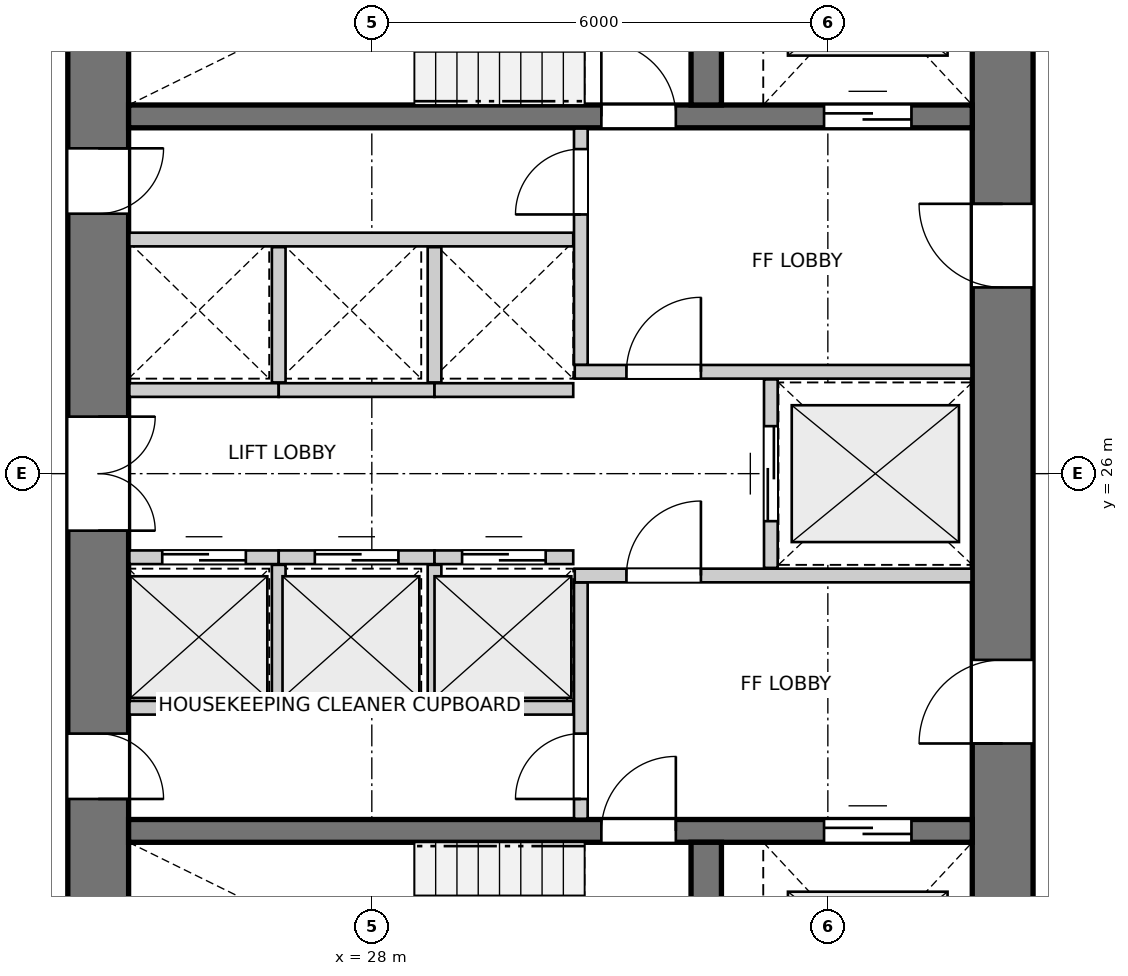
"""IFC4 building model, lengths in metres.
Left out: names, types, materials, properties, quantities, classifications, styles, units other than length and angle.
Written with IfcOpenShell. Run it as: python <this file> out.ifc"""

import sys

from ifc_helpers import new_model, si_unit, direction, frame, frame_2d, origin, place, context, subcontext, project, spatial, rectangle, extrude, source, transform, mapped, element, fill, save


model = new_model("IFC4")
c1 = context("Model", 3, precision=1e-05, world=origin(), true_north=direction((0.0, 1.0)))
c2 = subcontext(c1, "Body", "Model", "MODEL_VIEW")
j1 = project(units=[si_unit("LENGTHUNIT", "METRE"), si_unit("PLANEANGLEUNIT", "RADIAN")], contexts=[c1])
p1 = place(None, origin())
s1 = spatial("IfcSite", under=j1, at=p1, CompositionType="ELEMENT")
p2 = place(p1, origin())
s2 = spatial("IfcBuilding", under=s1, at=p2, CompositionType="ELEMENT")
p3 = place(p2, frame((0.0, 0.0, 7.8)))
s3 = spatial("IfcBuildingStorey", under=s2, at=p3, CompositionType="ELEMENT", Elevation=7.8)
p4 = place(p3, frame((24.4, 33.8, 0.0), z_axis=(0.0, 0.0, 1.0), x_axis=(0.0, -1.0, 0.0)))
e1 = element("IfcWall", 1, at=p4, inside=s3, PredefinedType="SHEAR", context=c2, shape_type="SweptSolid", body=[
    extrude(rectangle(XDim=15.6, YDim=0.8, at=frame_2d((7.8, 0.0))), origin(), (0.0, 0.0, 1.0), 2.94),
])
p5 = place(p4, frame((7.05, 0.0, 0.0)))
e2 = element("IfcOpeningElement", 2, at=p5, cuts=e1, PredefinedType="OPENING", context=c2, shape_type="SweptSolid", body=[
    extrude(rectangle(XDim=1.5, YDim=2.15, at=frame_2d((0.75, 1.075))), frame((0.0, 0.41, 0.0), z_axis=(0.0, -1.0, 0.0), x_axis=(1.0, 0.0, 0.0)), (0.0, 0.0, 1.0), 0.82),
])
p6 = place(p4, frame((3.52, 0.0, 0.0)))
e3 = element("IfcOpeningElement", 3, at=p6, cuts=e1, PredefinedType="OPENING", context=c2, shape_type="SweptSolid", body=[
    extrude(rectangle(XDim=0.86, YDim=2.05, at=frame_2d((0.43, 1.025))), frame((0.0, 0.41, 0.0), z_axis=(0.0, -1.0, 0.0), x_axis=(1.0, 0.0, 0.0)), (0.0, 0.0, 1.0), 0.82),
])
p7 = place(p4, frame((11.22, 0.0, 0.0)))
e4 = element("IfcOpeningElement", 4, at=p7, cuts=e1, PredefinedType="OPENING", context=c2, shape_type="SweptSolid", body=[
    extrude(rectangle(XDim=0.86, YDim=2.05, at=frame_2d((0.43, 1.025))), frame((0.0, 0.41, 0.0), z_axis=(0.0, -1.0, 0.0), x_axis=(1.0, 0.0, 0.0)), (0.0, 0.0, 1.0), 0.82),
])
p8 = place(p3, frame((36.3, 18.2, 0.0), z_axis=(0.0, 0.0, 1.0), x_axis=(0.0, 1.0, 0.0)))
e5 = element("IfcWall", 5, at=p8, inside=s3, PredefinedType="SHEAR", context=c2, shape_type="SweptSolid", body=[
    extrude(rectangle(XDim=15.6, YDim=0.8, at=frame_2d((7.8, 0.0))), origin(), (0.0, 0.0, 1.0), 2.94),
])
p9 = place(p8, frame((4.25, 0.0, 0.0)))
e6 = element("IfcOpeningElement", 6, at=p9, cuts=e5, PredefinedType="OPENING", context=c2, shape_type="SweptSolid", body=[
    extrude(rectangle(XDim=1.1, YDim=2.15, at=frame_2d((0.55, 1.075))), frame((0.0, 0.41, 0.0), z_axis=(0.0, -1.0, 0.0), x_axis=(1.0, 0.0, 0.0)), (0.0, 0.0, 1.0), 0.82),
])
p10 = place(p8, frame((10.25, 0.0, 0.0)))
e7 = element("IfcOpeningElement", 7, at=p10, cuts=e5, PredefinedType="OPENING", context=c2, shape_type="SweptSolid", body=[
    extrude(rectangle(XDim=1.1, YDim=2.15, at=frame_2d((0.55, 1.075))), frame((0.0, 0.41, 0.0), z_axis=(0.0, -1.0, 0.0), x_axis=(1.0, 0.0, 0.0)), (0.0, 0.0, 1.0), 0.82),
])
p11 = place(p3, frame((24.8, 21.3, 0.0), z_axis=(0.0, 0.0, 1.0), x_axis=(1.0, 0.0, 0.0)))
e8 = element("IfcWall", 8, at=p11, inside=s3, PredefinedType="SHEAR", context=c2, shape_type="SweptSolid", body=[
    extrude(rectangle(XDim=11.1, YDim=0.3, at=frame_2d((5.55, 0.0))), origin(), (0.0, 0.0, 1.0), 2.94),
])
p12 = place(p11, frame((6.22, 0.0, 0.0)))
e9 = element("IfcOpeningElement", 9, at=p12, cuts=e8, PredefinedType="OPENING", context=c2, shape_type="SweptSolid", body=[
    extrude(rectangle(XDim=0.98, YDim=2.15, at=frame_2d((0.49, 1.075))), frame((0.0, 0.16, 0.0), z_axis=(0.0, -1.0, 0.0), x_axis=(1.0, 0.0, 0.0)), (0.0, 0.0, 1.0), 0.32),
])
p13 = place(p11, frame((9.15, 0.0, 0.0)))
e10 = element("IfcOpeningElement", 10, at=p13, cuts=e8, PredefinedType="OPENING", context=c2, shape_type="SweptSolid", body=[
    extrude(rectangle(XDim=1.15, YDim=2.15, at=frame_2d((0.575, 1.075))), frame((0.0, 0.16, 0.0), z_axis=(0.0, -1.0, 0.0), x_axis=(1.0, 0.0, 0.0)), (0.0, 0.0, 1.0), 0.32),
])
p14 = place(p3, frame((32.4, 18.2, 0.0), z_axis=(0.0, 0.0, 1.0), x_axis=(0.0, 1.0, 0.0)))
e11 = element("IfcWall", 11, at=p14, inside=s3, PredefinedType="SHEAR", context=c2, shape_type="SweptSolid", body=[
    extrude(rectangle(XDim=2.95, YDim=0.4, at=frame_2d((1.475, 0.0))), origin(), (0.0, 0.0, 1.0), 2.94),
])
p15 = place(p3, frame((24.8, 30.7, 0.0), z_axis=(0.0, 0.0, 1.0), x_axis=(1.0, 0.0, 0.0)))
e12 = element("IfcWall", 12, at=p15, inside=s3, PredefinedType="SHEAR", context=c2, shape_type="SweptSolid", body=[
    extrude(rectangle(XDim=11.1, YDim=0.3, at=frame_2d((5.55, 0.0))), origin(), (0.0, 0.0, 1.0), 2.94),
])
p16 = place(p15, frame((6.22, 0.0, 0.0)))
e13 = element("IfcOpeningElement", 13, at=p16, cuts=e12, PredefinedType="OPENING", context=c2, shape_type="SweptSolid", body=[
    extrude(rectangle(XDim=0.98, YDim=2.15, at=frame_2d((0.49, 1.075))), frame((0.0, 0.16, 0.0), z_axis=(0.0, -1.0, 0.0), x_axis=(1.0, 0.0, 0.0)), (0.0, 0.0, 1.0), 0.32),
])
p17 = place(p15, frame((9.15, 0.0, 0.0)))
e14 = element("IfcOpeningElement", 14, at=p17, cuts=e12, PredefinedType="OPENING", context=c2, shape_type="SweptSolid", body=[
    extrude(rectangle(XDim=1.15, YDim=2.15, at=frame_2d((0.575, 1.075))), frame((0.0, 0.16, 0.0), z_axis=(0.0, -1.0, 0.0), x_axis=(1.0, 0.0, 0.0)), (0.0, 0.0, 1.0), 0.32),
])
p18 = place(p3, frame((32.4, 30.85, 0.0), z_axis=(0.0, 0.0, 1.0), x_axis=(0.0, 1.0, 0.0)))
e15 = element("IfcWall", 15, at=p18, inside=s3, PredefinedType="SHEAR", context=c2, shape_type="SweptSolid", body=[
    extrude(rectangle(XDim=2.95, YDim=0.4, at=frame_2d((1.475, 0.0))), origin(), (0.0, 0.0, 1.0), 2.94),
])
p19 = place(p3, frame((30.75, 21.46, 0.0), z_axis=(0.0, 0.0, 1.0), x_axis=(0.0, 1.0, 0.0)))
e16 = element("IfcWall", 16, at=p19, inside=s3, PredefinedType="PARTITIONING", context=c2, shape_type="SweptSolid", body=[
    extrude(rectangle(XDim=3.11, YDim=0.18, at=frame_2d((1.555, 0.0))), origin(), (0.0, 0.0, 1.0), 2.94),
])
p20 = place(p19, frame((0.26, 0.0, 0.0)))
e17 = element("IfcOpeningElement", 17, at=p20, cuts=e16, PredefinedType="OPENING", context=c2, shape_type="SweptSolid", body=[
    extrude(rectangle(XDim=0.86, YDim=2.05, at=frame_2d((0.43, 1.025))), frame((0.0, 0.1, 0.0), z_axis=(0.0, -1.0, 0.0), x_axis=(1.0, 0.0, 0.0)), (0.0, 0.0, 1.0), 0.2),
])
p21 = place(p3, frame((30.67, 24.66, 0.0), z_axis=(0.0, 0.0, 1.0), x_axis=(1.0, 0.0, 0.0)))
e18 = element("IfcWall", 18, at=p21, inside=s3, PredefinedType="PARTITIONING", context=c2, shape_type="SweptSolid", body=[
    extrude(rectangle(XDim=5.22, YDim=0.18, at=frame_2d((2.61, 0.0))), origin(), (0.0, 0.0, 1.0), 2.94),
])
p22 = place(p21, frame((0.68, 0.0, 0.0)))
e19 = element("IfcOpeningElement", 19, at=p22, cuts=e18, PredefinedType="OPENING", context=c2, shape_type="SweptSolid", body=[
    extrude(rectangle(XDim=0.98, YDim=2.15, at=frame_2d((0.49, 1.075))), frame((0.0, 0.1, 0.0), z_axis=(0.0, -1.0, 0.0), x_axis=(1.0, 0.0, 0.0)), (0.0, 0.0, 1.0), 0.2),
])
p23 = place(p3, frame((30.75, 27.43, 0.0), z_axis=(0.0, 0.0, 1.0), x_axis=(0.0, 1.0, 0.0)))
e20 = element("IfcWall", 20, at=p23, inside=s3, PredefinedType="PARTITIONING", context=c2, shape_type="SweptSolid", body=[
    extrude(rectangle(XDim=3.11, YDim=0.18, at=frame_2d((1.555, 0.0))), origin(), (0.0, 0.0, 1.0), 2.94),
])
p24 = place(p23, frame((1.98, 0.0, 0.0)))
e21 = element("IfcOpeningElement", 21, at=p24, cuts=e20, PredefinedType="OPENING", context=c2, shape_type="SweptSolid", body=[
    extrude(rectangle(XDim=0.86, YDim=2.05, at=frame_2d((0.43, 1.025))), frame((0.0, 0.1, 0.0), z_axis=(0.0, -1.0, 0.0), x_axis=(1.0, 0.0, 0.0)), (0.0, 0.0, 1.0), 0.2),
])
p25 = place(p3, frame((30.67, 27.34, 0.0), z_axis=(0.0, 0.0, 1.0), x_axis=(1.0, 0.0, 0.0)))
e22 = element("IfcWall", 22, at=p25, inside=s3, PredefinedType="PARTITIONING", context=c2, shape_type="SweptSolid", body=[
    extrude(rectangle(XDim=5.22, YDim=0.18, at=frame_2d((2.61, 0.0))), origin(), (0.0, 0.0, 1.0), 2.94),
])
p26 = place(p25, frame((0.68, 0.0, 0.0)))
e23 = element("IfcOpeningElement", 23, at=p26, cuts=e22, PredefinedType="OPENING", context=c2, shape_type="SweptSolid", body=[
    extrude(rectangle(XDim=0.98, YDim=2.15, at=frame_2d((0.49, 1.075))), frame((0.0, 0.1, 0.0), z_axis=(0.0, -1.0, 0.0), x_axis=(1.0, 0.0, 0.0)), (0.0, 0.0, 1.0), 0.2),
])
p27 = place(p3, frame((33.25, 24.76, 0.0), z_axis=(0.0, 0.0, 1.0), x_axis=(0.0, 1.0, 0.0)))
e24 = element("IfcWall", 24, at=p27, inside=s3, PredefinedType="PARTITIONING", context=c2, shape_type="SweptSolid", body=[
    extrude(rectangle(XDim=2.48, YDim=0.18, at=frame_2d((1.24, 0.0))), origin(), (0.0, 0.0, 1.0), 2.94),
])
p28 = place(p27, frame((0.615, 0.0, 0.0)))
e25 = element("IfcOpeningElement", 25, at=p28, cuts=e24, PredefinedType="OPENING", context=c2, shape_type="SweptSolid", body=[
    extrude(rectangle(XDim=1.25, YDim=2.15, at=frame_2d((0.625, 1.075))), frame((0.0, 0.1, 0.0), z_axis=(0.0, -1.0, 0.0), x_axis=(1.0, 0.0, 0.0)), (0.0, 0.0, 1.0), 0.2),
])
p29 = place(p3, frame((24.81, 22.92, 0.0), z_axis=(0.0, 0.0, 1.0), x_axis=(1.0, 0.0, 0.0)))
e26 = element("IfcWall", 26, at=p29, inside=s3, PredefinedType="PARTITIONING", context=c2, shape_type="SweptSolid", body=[
    extrude(rectangle(XDim=5.84, YDim=0.18, at=frame_2d((2.92, 0.0))), origin(), (0.0, 0.0, 1.0), 2.94),
])
p30 = place(p3, frame((24.81, 24.9, 0.0), z_axis=(0.0, 0.0, 1.0), x_axis=(1.0, 0.0, 0.0)))
e27 = element("IfcWall", 27, at=p30, inside=s3, PredefinedType="PARTITIONING", context=c2, shape_type="SweptSolid", body=[
    extrude(rectangle(XDim=1.965, YDim=0.18, at=frame_2d((0.982, 0.0))), origin(), (0.0, 0.0, 1.0), 2.94),
])
p31 = place(p30, frame((0.433, 0.0, 0.0)))
e28 = element("IfcOpeningElement", 28, at=p31, cuts=e27, PredefinedType="OPENING", context=c2, shape_type="SweptSolid", body=[
    extrude(rectangle(XDim=1.1, YDim=2.15, at=frame_2d((0.55, 1.075))), frame((0.0, 0.1, 0.0), z_axis=(0.0, -1.0, 0.0), x_axis=(1.0, 0.0, 0.0)), (0.0, 0.0, 1.0), 0.2),
])
p32 = place(p3, frame((26.775, 24.9, 0.0), z_axis=(0.0, 0.0, 1.0), x_axis=(1.0, 0.0, 0.0)))
e29 = element("IfcWall", 29, at=p32, inside=s3, PredefinedType="PARTITIONING", context=c2, shape_type="SweptSolid", body=[
    extrude(rectangle(XDim=2.05, YDim=0.18, at=frame_2d((1.025, 0.0))), origin(), (0.0, 0.0, 1.0), 2.94),
])
p33 = place(p32, frame((0.475, 0.0, 0.0)))
e30 = element("IfcOpeningElement", 30, at=p33, cuts=e29, PredefinedType="OPENING", context=c2, shape_type="SweptSolid", body=[
    extrude(rectangle(XDim=1.1, YDim=2.15, at=frame_2d((0.55, 1.075))), frame((0.0, 0.1, 0.0), z_axis=(0.0, -1.0, 0.0), x_axis=(1.0, 0.0, 0.0)), (0.0, 0.0, 1.0), 0.2),
])
p34 = place(p3, frame((26.775, 23.02, 0.0), z_axis=(0.0, 0.0, 1.0), x_axis=(0.0, 1.0, 0.0)))
e31 = element("IfcWall", 31, at=p34, inside=s3, PredefinedType="PARTITIONING", context=c2, shape_type="SweptSolid", body=[
    extrude(rectangle(XDim=1.78, YDim=0.18, at=frame_2d((0.89, 0.0))), origin(), (0.0, 0.0, 1.0), 2.94),
])
p35 = place(p3, frame((28.825, 24.9, 0.0), z_axis=(0.0, 0.0, 1.0), x_axis=(1.0, 0.0, 0.0)))
e32 = element("IfcWall", 32, at=p35, inside=s3, PredefinedType="PARTITIONING", context=c2, shape_type="SweptSolid", body=[
    extrude(rectangle(XDim=1.825, YDim=0.18, at=frame_2d((0.913, 0.0))), origin(), (0.0, 0.0, 1.0), 2.94),
])
p36 = place(p35, frame((0.363, 0.0, 0.0)))
e33 = element("IfcOpeningElement", 33, at=p36, cuts=e32, PredefinedType="OPENING", context=c2, shape_type="SweptSolid", body=[
    extrude(rectangle(XDim=1.1, YDim=2.15, at=frame_2d((0.55, 1.075))), frame((0.0, 0.1, 0.0), z_axis=(0.0, -1.0, 0.0), x_axis=(1.0, 0.0, 0.0)), (0.0, 0.0, 1.0), 0.2),
])
p37 = place(p3, frame((28.825, 23.02, 0.0), z_axis=(0.0, 0.0, 1.0), x_axis=(0.0, 1.0, 0.0)))
e34 = element("IfcWall", 34, at=p37, inside=s3, PredefinedType="PARTITIONING", context=c2, shape_type="SweptSolid", body=[
    extrude(rectangle(XDim=1.78, YDim=0.18, at=frame_2d((0.89, 0.0))), origin(), (0.0, 0.0, 1.0), 2.94),
])
p38 = place(p3, frame((24.81, 29.08, 0.0), z_axis=(0.0, 0.0, 1.0), x_axis=(1.0, 0.0, 0.0)))
e35 = element("IfcWall", 35, at=p38, inside=s3, PredefinedType="PARTITIONING", context=c2, shape_type="SweptSolid", body=[
    extrude(rectangle(XDim=5.84, YDim=0.18, at=frame_2d((2.92, 0.0))), origin(), (0.0, 0.0, 1.0), 2.94),
])
p39 = place(p3, frame((24.81, 27.1, 0.0), z_axis=(0.0, 0.0, 1.0), x_axis=(1.0, 0.0, 0.0)))
e36 = element("IfcWall", 36, at=p39, inside=s3, PredefinedType="PARTITIONING", context=c2, shape_type="SweptSolid", body=[
    extrude(rectangle(XDim=1.965, YDim=0.18, at=frame_2d((0.982, 0.0))), origin(), (0.0, 0.0, 1.0), 2.94),
])
p40 = place(p3, frame((26.775, 27.1, 0.0), z_axis=(0.0, 0.0, 1.0), x_axis=(1.0, 0.0, 0.0)))
e37 = element("IfcWall", 37, at=p40, inside=s3, PredefinedType="PARTITIONING", context=c2, shape_type="SweptSolid", body=[
    extrude(rectangle(XDim=2.05, YDim=0.18, at=frame_2d((1.025, 0.0))), origin(), (0.0, 0.0, 1.0), 2.94),
])
p41 = place(p3, frame((26.775, 27.2, 0.0), z_axis=(0.0, 0.0, 1.0), x_axis=(0.0, 1.0, 0.0)))
e38 = element("IfcWall", 38, at=p41, inside=s3, PredefinedType="PARTITIONING", context=c2, shape_type="SweptSolid", body=[
    extrude(rectangle(XDim=1.78, YDim=0.18, at=frame_2d((0.89, 0.0))), origin(), (0.0, 0.0, 1.0), 2.94),
])
p42 = place(p3, frame((28.825, 27.1, 0.0), z_axis=(0.0, 0.0, 1.0), x_axis=(1.0, 0.0, 0.0)))
e39 = element("IfcWall", 39, at=p42, inside=s3, PredefinedType="PARTITIONING", context=c2, shape_type="SweptSolid", body=[
    extrude(rectangle(XDim=1.825, YDim=0.18, at=frame_2d((0.913, 0.0))), origin(), (0.0, 0.0, 1.0), 2.94),
])
p43 = place(p3, frame((28.825, 27.2, 0.0), z_axis=(0.0, 0.0, 1.0), x_axis=(0.0, 1.0, 0.0)))
e40 = element("IfcWall", 40, at=p43, inside=s3, PredefinedType="PARTITIONING", context=c2, shape_type="SweptSolid", body=[
    extrude(rectangle(XDim=1.78, YDim=0.18, at=frame_2d((0.89, 0.0))), origin(), (0.0, 0.0, 1.0), 2.94),
])
m1 = source(origin(), c2, "Body", "SweptSolid", [
    extrude(rectangle(XDim=0.98, YDim=2.15, at=frame_2d((0.49, 1.075))), frame((0.0, 0.025, 0.0), z_axis=(0.0, -1.0, 0.0), x_axis=(1.0, 0.0, 0.0)), (0.0, 0.0, 1.0), 0.05),
])
p44 = place(p12, origin())
e41 = element("IfcDoor", 41, at=p44, inside=s3, OperationType="SINGLE_SWING_RIGHT", PredefinedType="DOOR", context=c2, shape_type="MappedRepresentation", body=[
    mapped(m1, transform((0.0, 0.0, 0.0), x_axis=(1.0, 0.0, 0.0), y_axis=(0.0, 1.0, 0.0), z_axis=(0.0, 0.0, 1.0), scale=1.0)),
])
fill(e9, e41)
m2 = source(origin(), c2, "Body", "SweptSolid", [
    extrude(rectangle(XDim=1.15, YDim=2.15, at=frame_2d((0.575, 1.075))), frame((0.0, 0.025, 0.0), z_axis=(0.0, -1.0, 0.0), x_axis=(1.0, 0.0, 0.0)), (0.0, 0.0, 1.0), 0.05),
])
p45 = place(p13, origin())
e42 = element("IfcDoor", 42, at=p45, inside=s3, OperationType="DOUBLE_DOOR_SLIDING", PredefinedType="DOOR", context=c2, shape_type="MappedRepresentation", body=[
    mapped(m2, transform((0.0, 0.0, 0.0), x_axis=(1.0, 0.0, 0.0), y_axis=(0.0, 1.0, 0.0), z_axis=(0.0, 0.0, 1.0), scale=1.0)),
])
fill(e10, e42)
p46 = place(p16, origin())
e43 = element("IfcDoor", 43, at=p46, inside=s3, OperationType="SINGLE_SWING_LEFT", PredefinedType="DOOR", context=c2, shape_type="MappedRepresentation", body=[
    mapped(m1, transform((0.0, 0.0, 0.0), x_axis=(1.0, 0.0, 0.0), y_axis=(0.0, 1.0, 0.0), z_axis=(0.0, 0.0, 1.0), scale=1.0)),
])
fill(e13, e43)
p47 = place(p17, origin())
e44 = element("IfcDoor", 44, at=p47, inside=s3, OperationType="DOUBLE_DOOR_SLIDING", PredefinedType="DOOR", context=c2, shape_type="MappedRepresentation", body=[
    mapped(m2, transform((0.0, 0.0, 0.0), x_axis=(1.0, 0.0, 0.0), y_axis=(0.0, 1.0, 0.0), z_axis=(0.0, 0.0, 1.0), scale=1.0)),
])
fill(e14, e44)
m3 = source(origin(), c2, "Body", "SweptSolid", [
    extrude(rectangle(XDim=1.1, YDim=2.15, at=frame_2d((0.55, 1.075))), frame((0.0, 0.025, 0.0), z_axis=(0.0, -1.0, 0.0), x_axis=(1.0, 0.0, 0.0)), (0.0, 0.0, 1.0), 0.05),
])
p48 = place(p9, origin())
e45 = element("IfcDoor", 45, at=p48, inside=s3, OperationType="SINGLE_SWING_LEFT", PredefinedType="DOOR", context=c2, shape_type="MappedRepresentation", body=[
    mapped(m3, transform((0.0, 0.0, 0.0), x_axis=(1.0, 0.0, 0.0), y_axis=(0.0, 1.0, 0.0), z_axis=(0.0, 0.0, 1.0), scale=1.0)),
])
fill(e6, e45)
p49 = place(p10, origin())
e46 = element("IfcDoor", 46, at=p49, inside=s3, OperationType="SINGLE_SWING_RIGHT", PredefinedType="DOOR", context=c2, shape_type="MappedRepresentation", body=[
    mapped(m3, transform((0.0, 0.0, 0.0), x_axis=(1.0, 0.0, 0.0), y_axis=(0.0, 1.0, 0.0), z_axis=(0.0, 0.0, 1.0), scale=1.0)),
])
fill(e7, e46)
m4 = source(origin(), c2, "Body", "SweptSolid", [
    extrude(rectangle(XDim=1.5, YDim=2.15, at=frame_2d((0.75, 1.075))), frame((0.0, 0.025, 0.0), z_axis=(0.0, -1.0, 0.0), x_axis=(1.0, 0.0, 0.0)), (0.0, 0.0, 1.0), 0.05),
])
p50 = place(p5, origin())
e47 = element("IfcDoor", 47, at=p50, inside=s3, OperationType="DOUBLE_DOOR_SINGLE_SWING", PredefinedType="DOOR", context=c2, shape_type="MappedRepresentation", body=[
    mapped(m4, transform((0.0, 0.0, 0.0), x_axis=(1.0, 0.0, 0.0), y_axis=(0.0, 1.0, 0.0), z_axis=(0.0, 0.0, 1.0), scale=1.0)),
])
fill(e2, e47)
m5 = source(origin(), c2, "Body", "SweptSolid", [
    extrude(rectangle(XDim=0.86, YDim=2.05, at=frame_2d((0.43, 1.025))), frame((0.0, 0.025, 0.0), z_axis=(0.0, -1.0, 0.0), x_axis=(1.0, 0.0, 0.0)), (0.0, 0.0, 1.0), 0.05),
])
p51 = place(p6, origin())
e48 = element("IfcDoor", 48, at=p51, inside=s3, OperationType="SINGLE_SWING_LEFT", PredefinedType="DOOR", context=c2, shape_type="MappedRepresentation", body=[
    mapped(m5, transform((0.0, 0.0, 0.0), x_axis=(1.0, 0.0, 0.0), y_axis=(0.0, 1.0, 0.0), z_axis=(0.0, 0.0, 1.0), scale=1.0)),
])
fill(e3, e48)
p52 = place(p7, origin())
e49 = element("IfcDoor", 49, at=p52, inside=s3, OperationType="SINGLE_SWING_RIGHT", PredefinedType="DOOR", context=c2, shape_type="MappedRepresentation", body=[
    mapped(m5, transform((0.0, 0.0, 0.0), x_axis=(1.0, 0.0, 0.0), y_axis=(0.0, 1.0, 0.0), z_axis=(0.0, 0.0, 1.0), scale=1.0)),
])
fill(e4, e49)
p53 = place(p20, origin())
e50 = element("IfcDoor", 50, at=p53, inside=s3, OperationType="SINGLE_SWING_LEFT", PredefinedType="DOOR", context=c2, shape_type="MappedRepresentation", body=[
    mapped(m5, transform((0.0, 0.0, 0.0), x_axis=(1.0, 0.0, 0.0), y_axis=(0.0, 1.0, 0.0), z_axis=(0.0, 0.0, 1.0), scale=1.0)),
])
fill(e17, e50)
p54 = place(p22, origin())
e51 = element("IfcDoor", 51, at=p54, inside=s3, OperationType="SINGLE_SWING_RIGHT", PredefinedType="DOOR", context=c2, shape_type="MappedRepresentation", body=[
    mapped(m1, transform((0.0, 0.0, 0.0), x_axis=(1.0, 0.0, 0.0), y_axis=(0.0, 1.0, 0.0), z_axis=(0.0, 0.0, 1.0), scale=1.0)),
])
fill(e19, e51)
p55 = place(p24, origin())
e52 = element("IfcDoor", 52, at=p55, inside=s3, OperationType="SINGLE_SWING_LEFT", PredefinedType="DOOR", context=c2, shape_type="MappedRepresentation", body=[
    mapped(m5, transform((0.0, 0.0, 0.0), x_axis=(1.0, 0.0, 0.0), y_axis=(0.0, 1.0, 0.0), z_axis=(0.0, 0.0, 1.0), scale=1.0)),
])
fill(e21, e52)
p56 = place(p26, origin())
e53 = element("IfcDoor", 53, at=p56, inside=s3, OperationType="SINGLE_SWING_RIGHT", PredefinedType="DOOR", context=c2, shape_type="MappedRepresentation", body=[
    mapped(m1, transform((0.0, 0.0, 0.0), x_axis=(1.0, 0.0, 0.0), y_axis=(0.0, 1.0, 0.0), z_axis=(0.0, 0.0, 1.0), scale=1.0)),
])
fill(e23, e53)
m6 = source(origin(), c2, "Body", "SweptSolid", [
    extrude(rectangle(XDim=1.25, YDim=2.15, at=frame_2d((0.625, 1.075))), frame((0.0, 0.025, 0.0), z_axis=(0.0, -1.0, 0.0), x_axis=(1.0, 0.0, 0.0)), (0.0, 0.0, 1.0), 0.05),
])
p57 = place(p28, origin())
e54 = element("IfcDoor", 54, at=p57, inside=s3, OperationType="DOUBLE_DOOR_SLIDING", PredefinedType="DOOR", context=c2, shape_type="MappedRepresentation", body=[
    mapped(m6, transform((0.0, 0.0, 0.0), x_axis=(1.0, 0.0, 0.0), y_axis=(0.0, 1.0, 0.0), z_axis=(0.0, 0.0, 1.0), scale=1.0)),
])
fill(e25, e54)
p58 = place(p31, origin())
e55 = element("IfcDoor", 55, at=p58, inside=s3, OperationType="DOUBLE_DOOR_SLIDING", PredefinedType="DOOR", context=c2, shape_type="MappedRepresentation", body=[
    mapped(m3, transform((0.0, 0.0, 0.0), x_axis=(1.0, 0.0, 0.0), y_axis=(0.0, 1.0, 0.0), z_axis=(0.0, 0.0, 1.0), scale=1.0)),
])
fill(e28, e55)
p59 = place(p33, origin())
e56 = element("IfcDoor", 56, at=p59, inside=s3, OperationType="DOUBLE_DOOR_SLIDING", PredefinedType="DOOR", context=c2, shape_type="MappedRepresentation", body=[
    mapped(m3, transform((0.0, 0.0, 0.0), x_axis=(1.0, 0.0, 0.0), y_axis=(0.0, 1.0, 0.0), z_axis=(0.0, 0.0, 1.0), scale=1.0)),
])
fill(e30, e56)
p60 = place(p36, origin())
e57 = element("IfcDoor", 57, at=p60, inside=s3, OperationType="DOUBLE_DOOR_SLIDING", PredefinedType="DOOR", context=c2, shape_type="MappedRepresentation", body=[
    mapped(m3, transform((0.0, 0.0, 0.0), x_axis=(1.0, 0.0, 0.0), y_axis=(0.0, 1.0, 0.0), z_axis=(0.0, 0.0, 1.0), scale=1.0)),
])
fill(e33, e57)
save(model, sys.argv[1])
